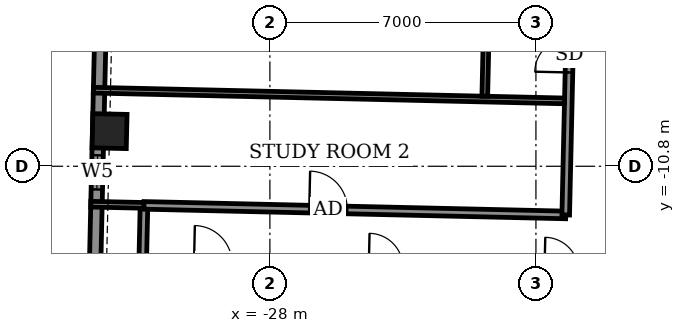
"""IFC4 building model, lengths in metres.
Left out: names, types, materials, properties, quantities, classifications, styles, units other than length and angle.
Written with IfcOpenShell. Run it as: python <this file> out.ifc"""

import sys

from ifc_helpers import new_model, si_unit, direction, frame, frame_2d, origin, origin_2d, place, context, subcontext, project, spatial, rectangle, extrude, element, fill, save


model = new_model("IFC4")
c1 = context("Model", 3, precision=1e-05, world=origin(), true_north=direction((0.0, 1.0)))
c2 = subcontext(c1, "Body", "Model", "MODEL_VIEW")
j1 = project(units=[si_unit("LENGTHUNIT", "METRE"), si_unit("PLANEANGLEUNIT", "RADIAN")], contexts=[c1])
p1 = place(None, origin())
s1 = spatial("IfcSite", under=j1, at=p1, CompositionType="ELEMENT")
p2 = place(p1, origin())
s2 = spatial("IfcBuilding", under=s1, at=p2, CompositionType="ELEMENT")
p3 = place(p2, frame((0.0, 0.0, 306.1)))
s3 = spatial("IfcBuildingStorey", under=s2, at=p3, CompositionType="ELEMENT", Elevation=306.1)
p4 = place(p3, frame((-32.219, -9.875, -0.55), z_axis=(0.0, 0.0, 1.0), x_axis=(-0.022653360746, -0.999743379696, 0.0)))
e1 = element("IfcColumn", 1, at=p4, inside=s3, PredefinedType="COLUMN", context=c2, shape_type="SweptSolid", body=[
    extrude(rectangle(XDim=0.9, YDim=0.9, at=origin_2d()), origin(), (0.0, 0.0, 1.0), 3.6),
])
p5 = place(p3, frame((-32.388, -4.079, 0.0), z_axis=(0.0, 0.0, 1.0), x_axis=(-0.022673163436, -0.999742930788, 0.0)))
e2 = element("IfcWall", 2, at=p5, inside=s3, PredefinedType="SOLIDWALL", context=c2, shape_type="SweptSolid", body=[
    extrude(rectangle(XDim=16.324, YDim=0.3, at=frame_2d((8.162, 0.0))), origin(), (0.0, 0.0, 1.0), 2.55),
])
p6 = place(p5, frame((1.937, 0.0, 0.0)))
e3 = element("IfcOpeningElement", 3, at=p6, cuts=e2, PredefinedType="OPENING", context=c2, shape_type="SweptSolid", body=[
    extrude(rectangle(XDim=1.5, YDim=2.4, at=frame_2d((0.75, 1.2))), frame((0.0, 0.16, 0.0), z_axis=(0.0, -1.0, 0.0), x_axis=(1.0, 0.0, 0.0)), (0.0, 0.0, 1.0), 0.32),
])
p7 = place(p5, frame((6.433, 0.0, 0.9)))
e4 = element("IfcOpeningElement", 4, at=p7, cuts=e2, PredefinedType="OPENING", context=c2, shape_type="SweptSolid", body=[
    extrude(rectangle(XDim=0.9, YDim=1.5, at=frame_2d((0.45, 0.75))), frame((0.0, 0.16, 0.0), z_axis=(0.0, -1.0, 0.0), x_axis=(1.0, 0.0, 0.0)), (0.0, 0.0, 1.0), 0.32),
])
p8 = place(p5, frame((12.364, 0.0, 0.9)))
e5 = element("IfcOpeningElement", 5, at=p8, cuts=e2, PredefinedType="OPENING", context=c2, shape_type="SweptSolid", body=[
    extrude(rectangle(XDim=2.4, YDim=1.5, at=frame_2d((1.2, 0.75))), frame((0.0, 0.16, 0.0), z_axis=(0.0, -1.0, 0.0), x_axis=(1.0, 0.0, 0.0)), (0.0, 0.0, 1.0), 0.32),
])
p9 = place(p3, frame((-31.347, -13.329, 0.0), z_axis=(0.0, 0.0, 1.0), x_axis=(0.022617910375, 0.999744182344, 0.0)))
e6 = element("IfcWall", 6, at=p9, inside=s3, PredefinedType="PARTITIONING", context=c2, shape_type="SweptSolid", body=[
    extrude(rectangle(XDim=1.5, YDim=0.2, at=frame_2d((0.75, 0.0))), origin(), (0.0, 0.0, 1.0), 3.05),
])
p10 = place(p3, frame((-32.713, -11.798, 0.0), z_axis=(0.0, 0.0, 1.0), x_axis=(0.999756172383, -0.022081571112, 0.0)))
e7 = element("IfcWall", 7, at=p10, inside=s3, PredefinedType="PARTITIONING", context=c2, shape_type="SweptSolid", body=[
    extrude(rectangle(XDim=1.404, YDim=0.15, at=frame_2d((0.702, 0.0))), origin(), (0.0, 0.0, 1.0), 2.55),
])
p11 = place(p3, frame((-31.313, -11.829, 0.0), z_axis=(0.0, 0.0, 1.0), x_axis=(0.999742346277, -0.022698921993, 0.0)))
e8 = element("IfcWall", 8, at=p11, inside=s3, PredefinedType="PARTITIONING", context=c2, shape_type="SweptSolid", body=[
    extrude(rectangle(XDim=11.1, YDim=0.2, at=frame_2d((5.55, 0.0))), origin(), (0.0, 0.0, 1.0), 3.05),
])
p12 = place(p11, frame((4.35, 0.0, 0.0)))
e9 = element("IfcOpeningElement", 9, at=p12, cuts=e8, PredefinedType="OPENING", context=c2, shape_type="SweptSolid", body=[
    extrude(rectangle(XDim=1.0, YDim=2.1, at=frame_2d((0.5, 1.05))), frame((0.0, 0.11, 0.0), z_axis=(0.0, -1.0, 0.0), x_axis=(1.0, 0.0, 0.0)), (0.0, 0.0, 1.0), 0.22),
])
p13 = place(p3, frame((-20.216, -12.081, 0.0), z_axis=(0.0, 0.0, 1.0), x_axis=(0.02267447203, 0.999742901109, 0.0)))
e10 = element("IfcWall", 10, at=p13, inside=s3, PredefinedType="PARTITIONING", context=c2, shape_type="SweptSolid", body=[
    extrude(rectangle(XDim=27.65, YDim=0.2, at=frame_2d((13.825, 0.0))), origin(), (0.0, 0.0, 1.0), 3.05),
])
p14 = place(p13, frame((22.025, 0.0, 0.0)))
e11 = element("IfcOpeningElement", 11, at=p14, cuts=e10, PredefinedType="OPENING", context=c2, shape_type="SweptSolid", body=[
    extrude(rectangle(XDim=1.0, YDim=2.1, at=frame_2d((0.5, 1.05))), frame((0.0, 0.11, 0.0), z_axis=(0.0, -1.0, 0.0), x_axis=(1.0, 0.0, 0.0)), (0.0, 0.0, 1.0), 0.22),
])
p15 = place(p13, frame((18.155, 0.0, 0.0)))
e12 = element("IfcOpeningElement", 12, at=p15, cuts=e10, PredefinedType="OPENING", context=c2, shape_type="SweptSolid", body=[
    extrude(rectangle(XDim=1.0, YDim=2.1, at=frame_2d((0.5, 1.05))), frame((0.0, 0.11, 0.0), z_axis=(0.0, -1.0, 0.0), x_axis=(1.0, 0.0, 0.0)), (0.0, 0.0, 1.0), 0.22),
])
p16 = place(p13, frame((13.898, 0.0, 0.0)))
e13 = element("IfcOpeningElement", 13, at=p16, cuts=e10, PredefinedType="OPENING", context=c2, shape_type="SweptSolid", body=[
    extrude(rectangle(XDim=1.0, YDim=2.1, at=frame_2d((0.5, 1.05))), frame((0.0, 0.11, 0.0), z_axis=(0.0, -1.0, 0.0), x_axis=(1.0, 0.0, 0.0)), (0.0, 0.0, 1.0), 0.22),
])
p17 = place(p13, frame((9.405, 0.0, 0.0)))
e14 = element("IfcOpeningElement", 14, at=p17, cuts=e10, PredefinedType="OPENING", context=c2, shape_type="SweptSolid", body=[
    extrude(rectangle(XDim=1.0, YDim=2.1, at=frame_2d((0.5, 1.05))), frame((0.0, 0.11, 0.0), z_axis=(0.0, -1.0, 0.0), x_axis=(1.0, 0.0, 0.0)), (0.0, 0.0, 1.0), 0.22),
])
p18 = place(p13, frame((5.837, 0.0, 0.0)))
e15 = element("IfcOpeningElement", 15, at=p18, cuts=e10, PredefinedType="OPENING", context=c2, shape_type="SweptSolid", body=[
    extrude(rectangle(XDim=1.0, YDim=2.1, at=frame_2d((0.5, 1.05))), frame((0.0, 0.11, 0.0), z_axis=(0.0, -1.0, 0.0), x_axis=(1.0, 0.0, 0.0)), (0.0, 0.0, 1.0), 0.22),
])
p19 = place(p13, frame((3.75, 0.0, 0.0)))
e16 = element("IfcOpeningElement", 16, at=p19, cuts=e10, PredefinedType="OPENING", context=c2, shape_type="SweptSolid", body=[
    extrude(rectangle(XDim=0.9, YDim=2.1, at=frame_2d((0.45, 1.05))), frame((0.0, 0.11, 0.0), z_axis=(0.0, -1.0, 0.0), x_axis=(1.0, 0.0, 0.0)), (0.0, 0.0, 1.0), 0.22),
])
p20 = place(p3, frame((-32.645, -8.798, 0.0), z_axis=(0.0, 0.0, 1.0), x_axis=(0.999741408463, -0.022740189192, 0.0)))
e17 = element("IfcWall", 17, at=p20, inside=s3, PredefinedType="PARTITIONING", context=c2, shape_type="SweptSolid", body=[
    extrude(rectangle(XDim=12.4, YDim=0.15, at=frame_2d((6.2, 0.0))), origin(), (0.0, 0.0, 1.0), 2.55),
])
p21 = place(p3, frame((-22.346, -8.957, 0.0), z_axis=(0.0, 0.0, 1.0), x_axis=(0.02279059109, 0.999740260747, 0.0)))
e18 = element("IfcWall", 18, at=p21, inside=s3, PredefinedType="PARTITIONING", context=c2, shape_type="SweptSolid", body=[
    extrude(rectangle(XDim=2.324, YDim=0.15, at=frame_2d((1.162, 0.0))), origin(), (0.0, 0.0, 1.0), 3.05),
])
p22 = place(p7, origin())
e19 = element("IfcWindow", 19, at=p22, inside=s3, PartitioningType="SINGLE_PANEL", PredefinedType="WINDOW", context=c2, shape_type="SweptSolid", body=[
    extrude(rectangle(XDim=0.9, YDim=1.5, at=frame_2d((0.45, 0.75))), frame((0.0, 0.03, 0.0), z_axis=(0.0, -1.0, 0.0), x_axis=(1.0, 0.0, 0.0)), (0.0, 0.0, 1.0), 0.06),
])
fill(e4, e19)
p23 = place(p19, origin())
e20 = element("IfcDoor", 20, at=p23, inside=s3, OperationType="SINGLE_SWING_LEFT", PredefinedType="DOOR", context=c2, shape_type="SweptSolid", body=[
    extrude(rectangle(XDim=0.9, YDim=2.1, at=frame_2d((0.45, 1.05))), frame((0.0, 0.025, 0.0), z_axis=(0.0, -1.0, 0.0), x_axis=(1.0, 0.0, 0.0)), (0.0, 0.0, 1.0), 0.05),
])
fill(e16, e20)
p24 = place(p12, origin())
e21 = element("IfcDoor", 21, at=p24, inside=s3, OperationType="SINGLE_SWING_LEFT", PredefinedType="DOOR", context=c2, shape_type="SweptSolid", body=[
    extrude(rectangle(XDim=1.0, YDim=2.1, at=frame_2d((0.5, 1.05))), frame((0.0, 0.025, 0.0), z_axis=(0.0, -1.0, 0.0), x_axis=(1.0, 0.0, 0.0)), (0.0, 0.0, 1.0), 0.05),
])
fill(e9, e21)
save(model, sys.argv[1])
